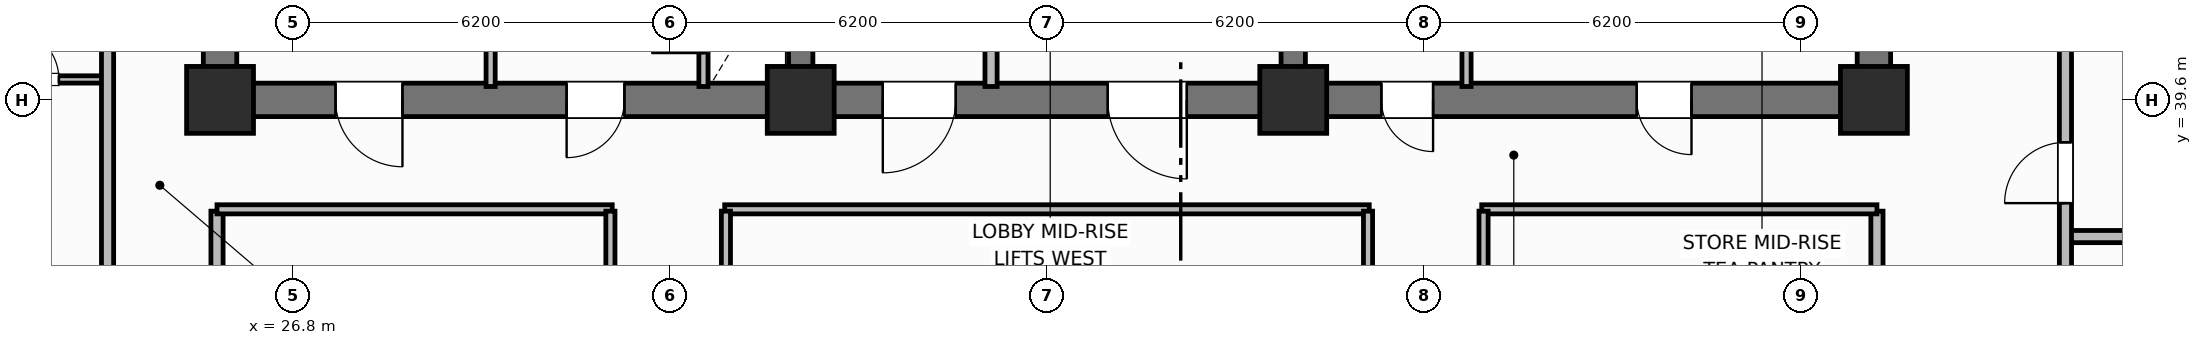
"""IFC4 building model, lengths in metres.
Left out: names, types, materials, properties, quantities, classifications, styles, units other than length and angle.
Written with IfcOpenShell. Run it as: python <this file> out.ifc"""

import sys

from ifc_helpers import new_model, si_unit, direction, frame, frame_2d, origin, origin_2d, place, context, subcontext, project, spatial, rectangle, extrude, element, fill, save


model = new_model("IFC4")
c1 = context("Model", 3, precision=1e-05, world=origin(), true_north=direction((0.0, 1.0)))
c2 = subcontext(c1, "Body", "Model", "MODEL_VIEW")
j1 = project(units=[si_unit("LENGTHUNIT", "METRE"), si_unit("PLANEANGLEUNIT", "RADIAN")], contexts=[c1])
p1 = place(None, origin())
s1 = spatial("IfcSite", under=j1, at=p1, CompositionType="ELEMENT")
p2 = place(p1, origin())
s2 = spatial("IfcBuilding", under=s1, at=p2, CompositionType="ELEMENT")
p3 = place(p2, frame((0.0, 0.0, 110.5)))
s3 = spatial("IfcBuildingStorey", under=s2, at=p3, CompositionType="ELEMENT", Elevation=110.5)
for number, where, z_axis, x_axis in (
    (1, (25.6, 39.875, 0.0), (0.0, 0.0, 1.0), (0.0, 1.0, 0.0)),
    (2, (52.8, 39.875, 0.0), (0.0, 0.0, 1.0), (0.0, 1.0, 0.0)),
):
    element("IfcWall", number, at=place(p3, frame(where, z_axis=z_axis, x_axis=x_axis)), inside=s3, PredefinedType="SHEAR", context=c2, shape_type="SweptSolid", body=[
        extrude(rectangle(XDim=5.65, YDim=0.55, at=frame_2d((2.825, 0.0))), origin(), (0.0, 0.0, 1.0), 3.7),
    ])
p4 = place(p3, frame((52.8, 39.6, 0.0), z_axis=(0.0, 0.0, 1.0), x_axis=(-1.0, 0.0, 0.0)))
e3 = element("IfcWall", 3, at=p4, inside=s3, PredefinedType="SHEAR", context=c2, shape_type="SweptSolid", body=[
    extrude(rectangle(XDim=27.2, YDim=0.55, at=frame_2d((13.6, 0.0))), origin(), (0.0, 0.0, 1.0), 3.7),
])
p5 = place(p4, frame((24.2, 0.0, 0.0)))
e4 = element("IfcOpeningElement", 4, at=p5, cuts=e3, PredefinedType="OPENING", context=c2, shape_type="SweptSolid", body=[
    extrude(rectangle(XDim=1.1, YDim=2.15, at=frame_2d((0.55, 1.075))), frame((0.0, 0.285, 0.0), z_axis=(0.0, -1.0, 0.0), x_axis=(1.0, 0.0, 0.0)), (0.0, 0.0, 1.0), 0.57),
])
p6 = place(p4, frame((20.55, 0.0, 0.0)))
e5 = element("IfcOpeningElement", 5, at=p6, cuts=e3, PredefinedType="OPENING", context=c2, shape_type="SweptSolid", body=[
    extrude(rectangle(XDim=0.95, YDim=2.1, at=frame_2d((0.475, 1.05))), frame((0.0, 0.285, 0.0), z_axis=(0.0, -1.0, 0.0), x_axis=(1.0, 0.0, 0.0)), (0.0, 0.0, 1.0), 0.57),
])
p7 = place(p4, frame((15.1, 0.0, 0.0)))
e6 = element("IfcOpeningElement", 6, at=p7, cuts=e3, PredefinedType="OPENING", context=c2, shape_type="SweptSolid", body=[
    extrude(rectangle(XDim=1.2, YDim=2.15, at=frame_2d((0.6, 1.075))), frame((0.0, 0.285, 0.0), z_axis=(0.0, -1.0, 0.0), x_axis=(1.0, 0.0, 0.0)), (0.0, 0.0, 1.0), 0.57),
])
p8 = place(p4, frame((11.3, 0.0, 0.0)))
e7 = element("IfcOpeningElement", 7, at=p8, cuts=e3, PredefinedType="OPENING", context=c2, shape_type="SweptSolid", body=[
    extrude(rectangle(XDim=1.3, YDim=2.2, at=frame_2d((0.65, 1.1))), frame((0.0, 0.285, 0.0), z_axis=(0.0, -1.0, 0.0), x_axis=(1.0, 0.0, 0.0)), (0.0, 0.0, 1.0), 0.57),
])
p9 = place(p4, frame((7.25, 0.0, 0.0)))
e8 = element("IfcOpeningElement", 8, at=p9, cuts=e3, PredefinedType="OPENING", context=c2, shape_type="SweptSolid", body=[
    extrude(rectangle(XDim=0.85, YDim=2.1, at=frame_2d((0.425, 1.05))), frame((0.0, 0.285, 0.0), z_axis=(0.0, -1.0, 0.0), x_axis=(1.0, 0.0, 0.0)), (0.0, 0.0, 1.0), 0.57),
])
p10 = place(p4, frame((3.0, 0.0, 0.0)))
e9 = element("IfcOpeningElement", 9, at=p10, cuts=e3, PredefinedType="OPENING", context=c2, shape_type="SweptSolid", body=[
    extrude(rectangle(XDim=0.9, YDim=2.1, at=frame_2d((0.45, 1.05))), frame((0.0, 0.285, 0.0), z_axis=(0.0, -1.0, 0.0), x_axis=(1.0, 0.0, 0.0)), (0.0, 0.0, 1.0), 0.57),
])
for number, where, z_axis, x_axis in (
    (10, (35.15, 39.875, 0.0), (0.0, 0.0, 1.0), (0.0, 1.0, 0.0)),
    (11, (43.25, 39.875, 0.0), (0.0, 0.0, 1.0), (0.0, 1.0, 0.0)),
):
    element("IfcWall", number, at=place(p3, frame(where, z_axis=z_axis, x_axis=x_axis)), inside=s3, PredefinedType="SHEAR", context=c2, shape_type="SweptSolid", body=[
        extrude(rectangle(XDim=5.65, YDim=0.4, at=frame_2d((2.825, 0.0))), origin(), (0.0, 0.0, 1.0), 3.7),
    ])
for number, where, z_axis, x_axis in (
    (12, (25.6, 39.6, 0.0), (0.0, 0.0, 1.0), (1.0, 0.0, 0.0)),
    (13, (35.15, 39.6, 0.0), (0.0, 0.0, 1.0), (1.0, 0.0, 0.0)),
    (14, (43.25, 39.6, 0.0), (0.0, 0.0, 1.0), (1.0, 0.0, 0.0)),
    (15, (52.8, 39.6, 0.0), (0.0, 0.0, 1.0), (1.0, 0.0, 0.0)),
):
    element("IfcColumn", number, at=place(p3, frame(where, z_axis=z_axis, x_axis=x_axis)), inside=s3, PredefinedType="COLUMN", context=c2, shape_type="SweptSolid", body=[
        extrude(rectangle(XDim=1.1, YDim=1.1, at=origin_2d()), origin(), (0.0, 0.0, 1.0), 3.7),
    ])
p11 = place(p3, frame((33.55, 39.82, 0.0), z_axis=(0.0, 0.0, 1.0), x_axis=(0.0, 1.0, 0.0)))
e16 = element("IfcWall", 16, at=p11, inside=s3, PredefinedType="PARTITIONING", context=c2, shape_type="SweptSolid", body=[
    extrude(rectangle(XDim=2.13, YDim=0.15, at=frame_2d((1.065, 0.0))), origin(), (0.0, 0.0, 1.0), 2.53),
])
p12 = place(p11, frame((0.55, 0.0, 0.0)))
e17 = element("IfcOpeningElement", 17, at=p12, cuts=e16, PredefinedType="OPENING", context=c2, shape_type="SweptSolid", body=[
    extrude(rectangle(XDim=0.85, YDim=2.05, at=frame_2d((0.425, 1.025))), frame((0.0, 0.085, 0.0), z_axis=(0.0, -1.0, 0.0), x_axis=(1.0, 0.0, 0.0)), (0.0, 0.0, 1.0), 0.17),
])
p13 = place(p3, frame((30.05, 39.82, 0.0), z_axis=(0.0, 0.0, 1.0), x_axis=(0.0, 1.0, 0.0)))
e18 = element("IfcWall", 18, at=p13, inside=s3, PredefinedType="PARTITIONING", context=c2, shape_type="SweptSolid", body=[
    extrude(rectangle(XDim=2.13, YDim=0.15, at=frame_2d((1.065, 0.0))), origin(), (0.0, 0.0, 1.0), 2.53),
])
p14 = place(p3, frame((38.28, 39.82, 0.0), z_axis=(0.0, 0.0, 1.0), x_axis=(0.0, 1.0, 0.0)))
e19 = element("IfcWall", 19, at=p14, inside=s3, PredefinedType="PARTITIONING", context=c2, shape_type="SweptSolid", body=[
    extrude(rectangle(XDim=2.73, YDim=0.2, at=frame_2d((1.365, 0.0))), origin(), (0.0, 0.0, 1.0), 2.53),
])
p15 = place(p3, frame((46.1, 39.82, 0.0), z_axis=(0.0, 0.0, 1.0), x_axis=(0.0, 1.0, 0.0)))
e20 = element("IfcWall", 20, at=p15, inside=s3, PredefinedType="PARTITIONING", context=c2, shape_type="SweptSolid", body=[
    extrude(rectangle(XDim=2.73, YDim=0.15, at=frame_2d((1.365, 0.0))), origin(), (0.0, 0.0, 1.0), 2.53),
])
for number, where, z_axis, x_axis in (
    (21, (25.55, 18.63, 0.0), (0.0, 0.0, 1.0), (0.0, 1.0, 0.0)),
    (22, (52.85, 18.63, 0.0), (0.0, 0.0, 1.0), (0.0, 1.0, 0.0)),
):
    element("IfcWall", number, at=place(p3, frame(where, z_axis=z_axis, x_axis=x_axis)), inside=s3, PredefinedType="PARTITIONING", context=c2, shape_type="SweptSolid", body=[
        extrude(rectangle(XDim=19.14, YDim=0.2, at=frame_2d((9.57, 0.0))), origin(), (0.0, 0.0, 1.0), 2.53),
    ])
p16 = place(p3, frame((25.55, 37.8, 0.0), z_axis=(0.0, 0.0, 1.0), x_axis=(1.0, 0.0, 0.0)))
e23 = element("IfcWall", 23, at=p16, inside=s3, PredefinedType="PARTITIONING", context=c2, shape_type="SweptSolid", body=[
    extrude(rectangle(XDim=6.5, YDim=0.15, at=frame_2d((3.25, 0.0))), origin(), (0.0, 0.0, 1.0), 2.53),
])
p17 = place(p3, frame((33.9, 37.8, 0.0), z_axis=(0.0, 0.0, 1.0), x_axis=(1.0, 0.0, 0.0)))
e24 = element("IfcWall", 24, at=p17, inside=s3, PredefinedType="PARTITIONING", context=c2, shape_type="SweptSolid", body=[
    extrude(rectangle(XDim=10.6, YDim=0.15, at=frame_2d((5.3, 0.0))), origin(), (0.0, 0.0, 1.0), 2.53),
])
p18 = place(p3, frame((46.35, 37.8, 0.0), z_axis=(0.0, 0.0, 1.0), x_axis=(1.0, 0.0, 0.0)))
e25 = element("IfcWall", 25, at=p18, inside=s3, PredefinedType="PARTITIONING", context=c2, shape_type="SweptSolid", body=[
    extrude(rectangle(XDim=6.5, YDim=0.15, at=frame_2d((3.25, 0.0))), origin(), (0.0, 0.0, 1.0), 2.53),
])
p19 = place(p3, frame((32.02, 18.63, 0.0), z_axis=(0.0, 0.0, 1.0), x_axis=(0.0, 1.0, 0.0)))
e26 = element("IfcWall", 26, at=p19, inside=s3, PredefinedType="PARTITIONING", context=c2, shape_type="SweptSolid", body=[
    extrude(rectangle(XDim=19.14, YDim=0.15, at=frame_2d((9.57, 0.0))), origin(), (0.0, 0.0, 1.0), 2.53),
])
p20 = place(p19, frame((5.5, 0.0, 0.0)))
e27 = element("IfcOpeningElement", 27, at=p20, cuts=e26, PredefinedType="OPENING", context=c2, shape_type="SweptSolid", body=[
    extrude(rectangle(XDim=1.0, YDim=2.15, at=frame_2d((0.5, 1.075))), frame((0.0, 0.085, 0.0), z_axis=(0.0, -1.0, 0.0), x_axis=(1.0, 0.0, 0.0)), (0.0, 0.0, 1.0), 0.17),
])
p21 = place(p3, frame((33.92, 18.63, 0.0), z_axis=(0.0, 0.0, 1.0), x_axis=(0.0, 1.0, 0.0)))
e28 = element("IfcWall", 28, at=p21, inside=s3, PredefinedType="PARTITIONING", context=c2, shape_type="SweptSolid", body=[
    extrude(rectangle(XDim=19.14, YDim=0.15, at=frame_2d((9.57, 0.0))), origin(), (0.0, 0.0, 1.0), 2.53),
])
p22 = place(p21, frame((2.4, 0.0, 0.0)))
e29 = element("IfcOpeningElement", 29, at=p22, cuts=e28, PredefinedType="OPENING", context=c2, shape_type="SweptSolid", body=[
    extrude(rectangle(XDim=1.0, YDim=2.15, at=frame_2d((0.5, 1.075))), frame((0.0, 0.085, 0.0), z_axis=(0.0, -1.0, 0.0), x_axis=(1.0, 0.0, 0.0)), (0.0, 0.0, 1.0), 0.17),
])
p23 = place(p3, frame((44.48, 18.63, 0.0), z_axis=(0.0, 0.0, 1.0), x_axis=(0.0, 1.0, 0.0)))
e30 = element("IfcWall", 30, at=p23, inside=s3, PredefinedType="PARTITIONING", context=c2, shape_type="SweptSolid", body=[
    extrude(rectangle(XDim=19.14, YDim=0.15, at=frame_2d((9.57, 0.0))), origin(), (0.0, 0.0, 1.0), 2.53),
])
p24 = place(p23, frame((10.804, 0.0, 0.0)))
e31 = element("IfcOpeningElement", 31, at=p24, cuts=e30, PredefinedType="OPENING", context=c2, shape_type="SweptSolid", body=[
    extrude(rectangle(XDim=1.0, YDim=2.15, at=frame_2d((0.5, 1.075))), frame((0.0, 0.085, 0.0), z_axis=(0.0, -1.0, 0.0), x_axis=(1.0, 0.0, 0.0)), (0.0, 0.0, 1.0), 0.17),
])
p25 = place(p3, frame((46.38, 18.63, 0.0), z_axis=(0.0, 0.0, 1.0), x_axis=(0.0, 1.0, 0.0)))
e32 = element("IfcWall", 32, at=p25, inside=s3, PredefinedType="PARTITIONING", context=c2, shape_type="SweptSolid", body=[
    extrude(rectangle(XDim=19.14, YDim=0.15, at=frame_2d((9.57, 0.0))), origin(), (0.0, 0.0, 1.0), 2.53),
])
p26 = place(p25, frame((5.5, 0.0, 0.0)))
e33 = element("IfcOpeningElement", 33, at=p26, cuts=e32, PredefinedType="OPENING", context=c2, shape_type="SweptSolid", body=[
    extrude(rectangle(XDim=1.0, YDim=2.15, at=frame_2d((0.5, 1.075))), frame((0.0, 0.085, 0.0), z_axis=(0.0, -1.0, 0.0), x_axis=(1.0, 0.0, 0.0)), (0.0, 0.0, 1.0), 0.17),
])
p27 = place(p3, frame((21.5, 39.936, 0.0), z_axis=(0.0, 0.0, 1.0), x_axis=(1.0, 0.0, 0.0)))
e34 = element("IfcWall", 34, at=p27, inside=s3, PredefinedType="PARTITIONING", context=c2, shape_type="SweptSolid", body=[
    extrude(rectangle(XDim=2.25, YDim=0.12, at=frame_2d((1.125, 0.0))), origin(), (0.0, 0.0, 1.0), 2.53),
])
p28 = place(p27, frame((0.6, 0.0, 0.0)))
e35 = element("IfcOpeningElement", 35, at=p28, cuts=e34, PredefinedType="OPENING", context=c2, shape_type="SweptSolid", body=[
    extrude(rectangle(XDim=0.85, YDim=2.1, at=frame_2d((0.425, 1.05))), frame((0.0, 0.07, 0.0), z_axis=(0.0, -1.0, 0.0), x_axis=(1.0, 0.0, 0.0)), (0.0, 0.0, 1.0), 0.14),
])
p29 = place(p3, frame((23.75, 10.6, 0.0), z_axis=(0.0, 0.0, 1.0), x_axis=(0.0, 1.0, 0.0)))
e36 = element("IfcWall", 36, at=p29, inside=s3, PredefinedType="PARTITIONING", context=c2, shape_type="SweptSolid", body=[
    extrude(rectangle(XDim=35.2, YDim=0.2, at=frame_2d((17.6, 0.0))), origin(), (0.0, 0.0, 1.0), 2.53),
])
p30 = place(p29, frame((2.65, 0.0, 0.0)))
e37 = element("IfcOpeningElement", 37, at=p30, cuts=e36, PredefinedType="OPENING", context=c2, shape_type="SweptSolid", body=[
    extrude(rectangle(XDim=1.0, YDim=2.15, at=frame_2d((0.5, 1.075))), frame((0.0, 0.11, 0.0), z_axis=(0.0, -1.0, 0.0), x_axis=(1.0, 0.0, 0.0)), (0.0, 0.0, 1.0), 0.22),
])
p31 = place(p29, frame((12.87, 0.0, 0.0)))
e38 = element("IfcOpeningElement", 38, at=p31, cuts=e36, PredefinedType="OPENING", context=c2, shape_type="SweptSolid", body=[
    extrude(rectangle(XDim=1.0, YDim=2.15, at=frame_2d((0.5, 1.075))), frame((0.0, 0.11, 0.0), z_axis=(0.0, -1.0, 0.0), x_axis=(1.0, 0.0, 0.0)), (0.0, 0.0, 1.0), 0.22),
])
p32 = place(p29, frame((24.486, 0.0, 0.0)))
e39 = element("IfcOpeningElement", 39, at=p32, cuts=e36, PredefinedType="OPENING", context=c2, shape_type="SweptSolid", body=[
    extrude(rectangle(XDim=1.0, YDim=2.15, at=frame_2d((0.5, 1.075))), frame((0.0, 0.11, 0.0), z_axis=(0.0, -1.0, 0.0), x_axis=(1.0, 0.0, 0.0)), (0.0, 0.0, 1.0), 0.22),
])
p33 = place(p3, frame((55.95, 37.352, 0.0), z_axis=(0.0, 0.0, 1.0), x_axis=(1.0, 0.0, 0.0)))
e40 = element("IfcWall", 40, at=p33, inside=s3, PredefinedType="PARTITIONING", context=c2, shape_type="SweptSolid", body=[
    extrude(rectangle(XDim=7.88, YDim=0.2, at=frame_2d((3.94, 0.0))), origin(), (0.0, 0.0, 1.0), 2.53),
])
p34 = place(p3, frame((55.95, 10.6, 0.0), z_axis=(0.0, 0.0, 1.0), x_axis=(0.0, 1.0, 0.0)))
e41 = element("IfcWall", 41, at=p34, inside=s3, PredefinedType="PARTITIONING", context=c2, shape_type="SweptSolid", body=[
    extrude(rectangle(XDim=35.2, YDim=0.2, at=frame_2d((17.6, 0.0))), origin(), (0.0, 0.0, 1.0), 2.53),
])
p35 = place(p34, frame((2.65, 0.0, 0.0)))
e42 = element("IfcOpeningElement", 42, at=p35, cuts=e41, PredefinedType="OPENING", context=c2, shape_type="SweptSolid", body=[
    extrude(rectangle(XDim=1.0, YDim=2.15, at=frame_2d((0.5, 1.075))), frame((0.0, 0.11, 0.0), z_axis=(0.0, -1.0, 0.0), x_axis=(1.0, 0.0, 0.0)), (0.0, 0.0, 1.0), 0.22),
])
p36 = place(p34, frame((11.352, 0.0, 0.0)))
e43 = element("IfcOpeningElement", 43, at=p36, cuts=e41, PredefinedType="OPENING", context=c2, shape_type="SweptSolid", body=[
    extrude(rectangle(XDim=1.0, YDim=2.15, at=frame_2d((0.5, 1.075))), frame((0.0, 0.11, 0.0), z_axis=(0.0, -1.0, 0.0), x_axis=(1.0, 0.0, 0.0)), (0.0, 0.0, 1.0), 0.22),
])
p37 = place(p34, frame((21.37, 0.0, 0.0)))
e44 = element("IfcOpeningElement", 44, at=p37, cuts=e41, PredefinedType="OPENING", context=c2, shape_type="SweptSolid", body=[
    extrude(rectangle(XDim=1.0, YDim=2.15, at=frame_2d((0.5, 1.075))), frame((0.0, 0.11, 0.0), z_axis=(0.0, -1.0, 0.0), x_axis=(1.0, 0.0, 0.0)), (0.0, 0.0, 1.0), 0.22),
])
p38 = place(p34, frame((27.302, 0.0, 0.0)))
e45 = element("IfcOpeningElement", 45, at=p38, cuts=e41, PredefinedType="OPENING", context=c2, shape_type="SweptSolid", body=[
    extrude(rectangle(XDim=1.0, YDim=2.15, at=frame_2d((0.5, 1.075))), frame((0.0, 0.11, 0.0), z_axis=(0.0, -1.0, 0.0), x_axis=(1.0, 0.0, 0.0)), (0.0, 0.0, 1.0), 0.22),
])
p39 = place(p12, origin())
e46 = element("IfcDoor", 46, at=p39, inside=s3, OperationType="SINGLE_SWING_LEFT", PredefinedType="TRAPDOOR", context=c2, shape_type="SweptSolid", body=[
    extrude(rectangle(XDim=0.85, YDim=2.05, at=frame_2d((0.425, 1.025))), frame((0.0, 0.025, 0.0), z_axis=(0.0, -1.0, 0.0), x_axis=(1.0, 0.0, 0.0)), (0.0, 0.0, 1.0), 0.05),
])
fill(e17, e46)
p40 = place(p28, origin())
e47 = element("IfcDoor", 47, at=p40, inside=s3, OperationType="SINGLE_SWING_LEFT", PredefinedType="DOOR", context=c2, shape_type="SweptSolid", body=[
    extrude(rectangle(XDim=0.85, YDim=2.1, at=frame_2d((0.425, 1.05))), frame((0.0, 0.025, 0.0), z_axis=(0.0, -1.0, 0.0), x_axis=(1.0, 0.0, 0.0)), (0.0, 0.0, 1.0), 0.05),
])
fill(e35, e47)
p41 = place(p38, origin())
e48 = element("IfcDoor", 48, at=p41, inside=s3, OperationType="SINGLE_SWING_LEFT", PredefinedType="DOOR", context=c2, shape_type="SweptSolid", body=[
    extrude(rectangle(XDim=1.0, YDim=2.15, at=frame_2d((0.5, 1.075))), frame((0.0, 0.025, 0.0), z_axis=(0.0, -1.0, 0.0), x_axis=(1.0, 0.0, 0.0)), (0.0, 0.0, 1.0), 0.05),
])
fill(e45, e48)
p42 = place(p5, origin())
e49 = element("IfcDoor", 49, at=p42, inside=s3, OperationType="SINGLE_SWING_LEFT", PredefinedType="DOOR", context=c2, shape_type="SweptSolid", body=[
    extrude(rectangle(XDim=1.1, YDim=2.15, at=frame_2d((0.55, 1.075))), frame((0.0, 0.025, 0.0), z_axis=(0.0, -1.0, 0.0), x_axis=(1.0, 0.0, 0.0)), (0.0, 0.0, 1.0), 0.05),
])
fill(e4, e49)
p43 = place(p6, origin())
e50 = element("IfcDoor", 50, at=p43, inside=s3, OperationType="SINGLE_SWING_RIGHT", PredefinedType="DOOR", context=c2, shape_type="SweptSolid", body=[
    extrude(rectangle(XDim=0.95, YDim=2.1, at=frame_2d((0.475, 1.05))), frame((0.0, 0.025, 0.0), z_axis=(0.0, -1.0, 0.0), x_axis=(1.0, 0.0, 0.0)), (0.0, 0.0, 1.0), 0.05),
])
fill(e5, e50)
p44 = place(p7, origin())
e51 = element("IfcDoor", 51, at=p44, inside=s3, OperationType="SINGLE_SWING_RIGHT", PredefinedType="DOOR", context=c2, shape_type="SweptSolid", body=[
    extrude(rectangle(XDim=1.2, YDim=2.15, at=frame_2d((0.6, 1.075))), frame((0.0, 0.025, 0.0), z_axis=(0.0, -1.0, 0.0), x_axis=(1.0, 0.0, 0.0)), (0.0, 0.0, 1.0), 0.05),
])
fill(e6, e51)
p45 = place(p8, origin())
e52 = element("IfcDoor", 52, at=p45, inside=s3, OperationType="SINGLE_SWING_LEFT", PredefinedType="DOOR", context=c2, shape_type="SweptSolid", body=[
    extrude(rectangle(XDim=1.3, YDim=2.2, at=frame_2d((0.65, 1.1))), frame((0.0, 0.025, 0.0), z_axis=(0.0, -1.0, 0.0), x_axis=(1.0, 0.0, 0.0)), (0.0, 0.0, 1.0), 0.05),
])
fill(e7, e52)
p46 = place(p9, origin())
e53 = element("IfcDoor", 53, at=p46, inside=s3, OperationType="SINGLE_SWING_LEFT", PredefinedType="DOOR", context=c2, shape_type="SweptSolid", body=[
    extrude(rectangle(XDim=0.85, YDim=2.1, at=frame_2d((0.425, 1.05))), frame((0.0, 0.025, 0.0), z_axis=(0.0, -1.0, 0.0), x_axis=(1.0, 0.0, 0.0)), (0.0, 0.0, 1.0), 0.05),
])
fill(e8, e53)
p47 = place(p10, origin())
e54 = element("IfcDoor", 54, at=p47, inside=s3, OperationType="SINGLE_SWING_LEFT", PredefinedType="DOOR", context=c2, shape_type="SweptSolid", body=[
    extrude(rectangle(XDim=0.9, YDim=2.1, at=frame_2d((0.45, 1.05))), frame((0.0, 0.025, 0.0), z_axis=(0.0, -1.0, 0.0), x_axis=(1.0, 0.0, 0.0)), (0.0, 0.0, 1.0), 0.05),
])
fill(e9, e54)
save(model, sys.argv[1])
